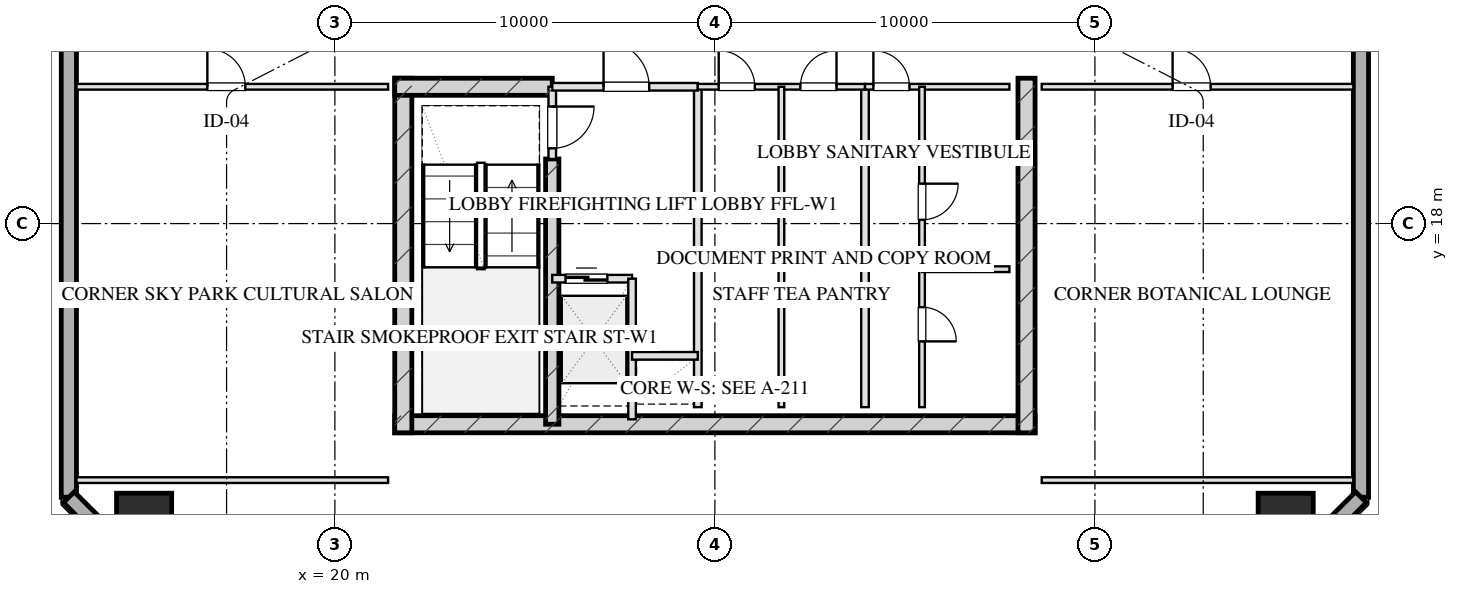
"""IFC4 building model, lengths in metres.
Left out: names, types, materials, properties, quantities, classifications, styles, units other than length and angle.
Written with IfcOpenShell. Run it as: python <this file> out.ifc"""

import sys

from ifc_helpers import new_model, si_unit, direction, frame, frame_2d, origin, origin_2d, place, context, subcontext, project, spatial, rectangle, hollow_rectangle, extrude, element, fill, save


model = new_model("IFC4")
c1 = context("Model", 3, precision=1e-05, world=origin(), true_north=direction((0.0, 1.0)))
c2 = subcontext(c1, "Body", "Model", "MODEL_VIEW")
j1 = project(units=[si_unit("LENGTHUNIT", "METRE"), si_unit("PLANEANGLEUNIT", "RADIAN")], contexts=[c1])
p1 = place(None, origin())
s1 = spatial("IfcSite", under=j1, at=p1, CompositionType="ELEMENT")
p2 = place(p1, origin())
s2 = spatial("IfcBuilding", under=s1, at=p2, CompositionType="ELEMENT")
p3 = place(p2, frame((0.0, 0.0, 216.2)))
s3 = spatial("IfcBuildingStorey", under=s2, at=p3, CompositionType="ELEMENT", Elevation=216.2)
p4 = place(p3, frame((21.575, 12.72, 0.0), z_axis=(0.0, 0.0, 1.0), x_axis=(1.0, 0.0, 0.0)))
e1 = element("IfcWall", 1, at=p4, inside=s3, PredefinedType="SHEAR", context=c2, shape_type="SweptSolid", body=[
    extrude(rectangle(XDim=16.85, YDim=0.45, at=frame_2d((8.425, 0.0))), origin(), (0.0, 0.0, 1.0), 3.45),
])
for number, where, z_axis, x_axis in (
    (2, (21.8, 21.825, 0.0), (0.0, 0.0, 1.0), (0.0, -1.0, 0.0)),
    (3, (38.2, 21.825, 0.0), (0.0, 0.0, 1.0), (0.0, -1.0, 0.0)),
):
    element("IfcWall", number, at=place(p3, frame(where, z_axis=z_axis, x_axis=x_axis)), inside=s3, PredefinedType="SHEAR", context=c2, shape_type="SweptSolid", body=[
        extrude(rectangle(XDim=9.33, YDim=0.45, at=frame_2d((4.665, 0.0))), origin(), (0.0, 0.0, 1.0), 3.45),
    ])
p5 = place(p3, frame((25.72, 19.7, 0.0), z_axis=(0.0, 0.0, 1.0), x_axis=(0.0, -1.0, 0.0)))
e4 = element("IfcWall", 4, at=p5, inside=s3, PredefinedType="SHEAR", context=c2, shape_type="SweptSolid", body=[
    extrude(rectangle(XDim=6.98, YDim=0.35, at=frame_2d((3.49, 0.0))), origin(), (0.0, 0.0, 1.0), 3.45),
])
p6 = place(p3, frame((21.575, 21.6, 0.0), z_axis=(0.0, 0.0, 1.0), x_axis=(1.0, 0.0, 0.0)))
e5 = element("IfcWall", 5, at=p6, inside=s3, PredefinedType="SHEAR", context=c2, shape_type="SweptSolid", body=[
    extrude(rectangle(XDim=4.145, YDim=0.45, at=frame_2d((2.073, 0.0))), origin(), (0.0, 0.0, 1.0), 3.45),
])
for number, where, z_axis, x_axis in (
    (6, (14.98, 10.18, 0.0), (0.0, 0.0, 1.0), (1.0, 0.0, 0.0)),
    (7, (45.02, 10.18, 0.0), (0.0, 0.0, 1.0), (1.0, 0.0, 0.0)),
):
    element("IfcColumn", number, at=place(p3, frame(where, z_axis=z_axis, x_axis=x_axis)), inside=s3, PredefinedType="COLUMN", context=c2, shape_type="SweptSolid", body=[
        extrude(hollow_rectangle(XDim=1.45, YDim=1.45, WallThickness=0.05, at=origin_2d()), origin(), (0.0, 0.0, 1.0), 3.451),
    ])
p7 = place(p3, frame((13.0, 10.8, 0.0), z_axis=(0.0, 0.0, 1.0), x_axis=(0.0, 1.0, 0.0)))
e8 = element("IfcWall", 8, at=p7, inside=s3, PredefinedType="SOLIDWALL", context=c2, shape_type="SweptSolid", body=[
    extrude(rectangle(XDim=46.4, YDim=0.4, at=frame_2d((23.2, 0.0))), origin(), (0.0, 0.0, 1.0), 2.55),
])
p8 = place(p7, frame((15.75, 0.0, 0.75)))
e9 = element("IfcOpeningElement", 9, at=p8, cuts=e8, PredefinedType="OPENING", context=c2, shape_type="SweptSolid", body=[
    extrude(rectangle(XDim=2.1, YDim=1.4, at=frame_2d((1.05, 0.7))), frame((0.0, 0.21, 0.0), z_axis=(0.0, -1.0, 0.0), x_axis=(1.0, 0.0, 0.0)), (0.0, 0.0, 1.0), 0.42),
])
p9 = place(p7, frame((19.55, 0.0, 0.75)))
e10 = element("IfcOpeningElement", 10, at=p9, cuts=e8, PredefinedType="OPENING", context=c2, shape_type="SweptSolid", body=[
    extrude(rectangle(XDim=2.1, YDim=1.4, at=frame_2d((1.05, 0.7))), frame((0.0, 0.21, 0.0), z_axis=(0.0, -1.0, 0.0), x_axis=(1.0, 0.0, 0.0)), (0.0, 0.0, 1.0), 0.42),
])
p10 = place(p7, frame((24.75, 0.0, 0.75)))
e11 = element("IfcOpeningElement", 11, at=p10, cuts=e8, PredefinedType="OPENING", context=c2, shape_type="SweptSolid", body=[
    extrude(rectangle(XDim=2.1, YDim=1.4, at=frame_2d((1.05, 0.7))), frame((0.0, 0.21, 0.0), z_axis=(0.0, -1.0, 0.0), x_axis=(1.0, 0.0, 0.0)), (0.0, 0.0, 1.0), 0.42),
])
p11 = place(p7, frame((28.55, 0.0, 0.75)))
e12 = element("IfcOpeningElement", 12, at=p11, cuts=e8, PredefinedType="OPENING", context=c2, shape_type="SweptSolid", body=[
    extrude(rectangle(XDim=2.1, YDim=1.4, at=frame_2d((1.05, 0.7))), frame((0.0, 0.21, 0.0), z_axis=(0.0, -1.0, 0.0), x_axis=(1.0, 0.0, 0.0)), (0.0, 0.0, 1.0), 0.42),
])
p12 = place(p3, frame((47.0, 57.2, 0.0), z_axis=(0.0, 0.0, 1.0), x_axis=(0.0, -1.0, 0.0)))
e13 = element("IfcWall", 13, at=p12, inside=s3, PredefinedType="SOLIDWALL", context=c2, shape_type="SweptSolid", body=[
    extrude(rectangle(XDim=46.4, YDim=0.4, at=frame_2d((23.2, 0.0))), origin(), (0.0, 0.0, 1.0), 2.55),
])
p13 = place(p12, frame((16.4, 0.0, 0.0)))
e14 = element("IfcOpeningElement", 14, at=p13, cuts=e13, PredefinedType="OPENING", context=c2, shape_type="SweptSolid", body=[
    extrude(rectangle(XDim=1.8, YDim=2.2, at=frame_2d((0.9, 1.1))), frame((0.0, 0.21, 0.0), z_axis=(0.0, -1.0, 0.0), x_axis=(1.0, 0.0, 0.0)), (0.0, 0.0, 1.0), 0.42),
])
for number, where, z_axis, x_axis in (
    (15, (47.0, 10.8, 0.0), (0.0, 0.0, 1.0), (-0.707, -0.707, 0.0)),
    (16, (15.6, 8.2, 0.0), (0.0, 0.0, 1.0), (-0.707, 0.707, 0.0)),
):
    element("IfcWall", number, at=place(p3, frame(where, z_axis=z_axis, x_axis=x_axis)), inside=s3, PredefinedType="SOLIDWALL", context=c2, shape_type="SweptSolid", body=[
        extrude(rectangle(XDim=3.677, YDim=0.4, at=frame_2d((1.838, 0.0))), origin(), (0.0, 0.0, 1.0), 2.55),
    ])
p14 = place(p3, frame((47.35, 26.55, 0.0), z_axis=(0.0, 0.0, 1.0), x_axis=(0.991732402874, -0.128323189996, 0.0)))
e17 = element("IfcWall", 17, at=p14, inside=s3, PredefinedType="SOLIDWALL", context=c2, shape_type="SweptSolid", body=[
    extrude(rectangle(XDim=31.725, YDim=0.35, at=frame_2d((15.862, 0.0))), origin(), (0.0, 0.0, 1.0), 3.15),
])
p15 = place(p3, frame((25.72, 21.6, 0.0), z_axis=(0.0, 0.0, 1.0), x_axis=(0.0, -1.0, 0.0)))
e18 = element("IfcWall", 18, at=p15, inside=s3, PredefinedType="PARTITIONING", context=c2, shape_type="SweptSolid", body=[
    extrude(rectangle(XDim=1.9, YDim=0.2, at=frame_2d((0.95, 0.0))), origin(), (0.0, 0.0, 1.0), 3.155),
])
p16 = place(p15, frame((0.52, 0.0, 0.0)))
e19 = element("IfcOpeningElement", 19, at=p16, cuts=e18, PredefinedType="OPENING", context=c2, shape_type="SweptSolid", body=[
    extrude(rectangle(XDim=1.1, YDim=2.05, at=frame_2d((0.55, 1.025))), frame((0.0, 0.11, 0.0), z_axis=(0.0, -1.0, 0.0), x_axis=(1.0, 0.0, 0.0)), (0.0, 0.0, 1.0), 0.22),
])
p17 = place(p3, frame((29.55, 21.6, 0.0), z_axis=(0.0, 0.0, 1.0), x_axis=(0.0, -1.0, 0.0)))
e20 = element("IfcWall", 20, at=p17, inside=s3, PredefinedType="PARTITIONING", context=c2, shape_type="SweptSolid", body=[
    extrude(rectangle(XDim=8.43, YDim=0.2, at=frame_2d((4.215, 0.0))), origin(), (0.0, 0.0, 1.0), 3.155),
])
p18 = place(p3, frame((25.72, 21.6, 0.0), z_axis=(0.0, 0.0, 1.0), x_axis=(1.0, 0.0, 0.0)))
e21 = element("IfcWall", 21, at=p18, inside=s3, PredefinedType="PARTITIONING", context=c2, shape_type="SweptSolid", body=[
    extrude(rectangle(XDim=3.83, YDim=0.2, at=frame_2d((1.915, 0.0))), origin(), (0.0, 0.0, 1.0), 3.155),
])
p19 = place(p18, frame((1.35, 0.0, 0.0)))
e22 = element("IfcOpeningElement", 22, at=p19, cuts=e21, PredefinedType="OPENING", context=c2, shape_type="SweptSolid", body=[
    extrude(rectangle(XDim=1.2, YDim=2.05, at=frame_2d((0.6, 1.025))), frame((0.0, 0.11, 0.0), z_axis=(0.0, -1.0, 0.0), x_axis=(1.0, 0.0, 0.0)), (0.0, 0.0, 1.0), 0.22),
])
p20 = place(p3, frame((25.72, 16.55, 0.0), z_axis=(0.0, 0.0, 1.0), x_axis=(1.0, 0.0, 0.0)))
e23 = element("IfcWall", 23, at=p20, inside=s3, PredefinedType="PARTITIONING", context=c2, shape_type="SweptSolid", body=[
    extrude(rectangle(XDim=2.1, YDim=0.2, at=frame_2d((1.05, 0.0))), origin(), (0.0, 0.0, 1.0), 3.155),
])
p21 = place(p20, frame((0.35, 0.0, 0.0)))
e24 = element("IfcOpeningElement", 24, at=p21, cuts=e23, PredefinedType="OPENING", context=c2, shape_type="SweptSolid", body=[
    extrude(rectangle(XDim=1.1, YDim=2.05, at=frame_2d((0.55, 1.025))), frame((0.0, 0.11, 0.0), z_axis=(0.0, -1.0, 0.0), x_axis=(1.0, 0.0, 0.0)), (0.0, 0.0, 1.0), 0.22),
])
p22 = place(p3, frame((27.82, 16.55, 0.0), z_axis=(0.0, 0.0, 1.0), x_axis=(0.0, -1.0, 0.0)))
e25 = element("IfcWall", 25, at=p22, inside=s3, PredefinedType="PARTITIONING", context=c2, shape_type="SweptSolid", body=[
    extrude(rectangle(XDim=3.7, YDim=0.2, at=frame_2d((1.85, 0.0))), origin(), (0.0, 0.0, 1.0), 3.155),
])
p23 = place(p3, frame((27.82, 14.52, 0.0), z_axis=(0.0, 0.0, 1.0), x_axis=(1.0, 0.0, 0.0)))
e26 = element("IfcWall", 26, at=p23, inside=s3, PredefinedType="PARTITIONING", context=c2, shape_type="SweptSolid", body=[
    extrude(rectangle(XDim=1.73, YDim=0.2, at=frame_2d((0.865, 0.0))), origin(), (0.0, 0.0, 1.0), 3.155),
])
p24 = place(p3, frame((33.95, 21.6, 0.0), z_axis=(0.0, 0.0, 1.0), x_axis=(0.0, -1.0, 0.0)))
e27 = element("IfcWall", 27, at=p24, inside=s3, PredefinedType="PARTITIONING", context=c2, shape_type="SweptSolid", body=[
    extrude(rectangle(XDim=8.43, YDim=0.2, at=frame_2d((4.215, 0.0))), origin(), (0.0, 0.0, 1.0), 3.155),
])
p25 = place(p3, frame((29.55, 21.6, 0.0), z_axis=(0.0, 0.0, 1.0), x_axis=(1.0, 0.0, 0.0)))
e28 = element("IfcWall", 28, at=p25, inside=s3, PredefinedType="PARTITIONING", context=c2, shape_type="SweptSolid", body=[
    extrude(rectangle(XDim=4.4, YDim=0.15, at=frame_2d((2.2, 0.0))), origin(), (0.0, 0.0, 1.0), 3.155),
])
p26 = place(p25, frame((0.55, 0.0, 0.0)))
e29 = element("IfcOpeningElement", 29, at=p26, cuts=e28, PredefinedType="OPENING", context=c2, shape_type="SweptSolid", body=[
    extrude(rectangle(XDim=0.95, YDim=2.05, at=frame_2d((0.475, 1.025))), frame((0.0, 0.085, 0.0), z_axis=(0.0, -1.0, 0.0), x_axis=(1.0, 0.0, 0.0)), (0.0, 0.0, 1.0), 0.17),
])
p27 = place(p25, frame((2.7, 0.0, 0.0)))
e30 = element("IfcOpeningElement", 30, at=p27, cuts=e28, PredefinedType="OPENING", context=c2, shape_type="SweptSolid", body=[
    extrude(rectangle(XDim=0.95, YDim=2.05, at=frame_2d((0.475, 1.025))), frame((0.0, 0.085, 0.0), z_axis=(0.0, -1.0, 0.0), x_axis=(1.0, 0.0, 0.0)), (0.0, 0.0, 1.0), 0.17),
])
p28 = place(p3, frame((31.75, 21.6, 0.0), z_axis=(0.0, 0.0, 1.0), x_axis=(0.0, -1.0, 0.0)))
e31 = element("IfcWall", 31, at=p28, inside=s3, PredefinedType="PARTITIONING", context=c2, shape_type="SweptSolid", body=[
    extrude(rectangle(XDim=8.43, YDim=0.15, at=frame_2d((4.215, 0.0))), origin(), (0.0, 0.0, 1.0), 3.155),
])
p29 = place(p3, frame((33.95, 21.6, 0.0), z_axis=(0.0, 0.0, 1.0), x_axis=(1.0, 0.0, 0.0)))
e32 = element("IfcWall", 32, at=p29, inside=s3, PredefinedType="PARTITIONING", context=c2, shape_type="SweptSolid", body=[
    extrude(rectangle(XDim=3.8, YDim=0.15, at=frame_2d((1.9, 0.0))), origin(), (0.0, 0.0, 1.0), 3.155),
])
p30 = place(p29, frame((0.22, 0.0, 0.0)))
e33 = element("IfcOpeningElement", 33, at=p30, cuts=e32, PredefinedType="OPENING", context=c2, shape_type="SweptSolid", body=[
    extrude(rectangle(XDim=0.95, YDim=2.05, at=frame_2d((0.475, 1.025))), frame((0.0, 0.085, 0.0), z_axis=(0.0, -1.0, 0.0), x_axis=(1.0, 0.0, 0.0)), (0.0, 0.0, 1.0), 0.17),
])
p31 = place(p3, frame((35.45, 21.6, 0.0), z_axis=(0.0, 0.0, 1.0), x_axis=(0.0, -1.0, 0.0)))
e34 = element("IfcWall", 34, at=p31, inside=s3, PredefinedType="PARTITIONING", context=c2, shape_type="SweptSolid", body=[
    extrude(rectangle(XDim=8.43, YDim=0.15, at=frame_2d((4.215, 0.0))), origin(), (0.0, 0.0, 1.0), 2.745),
])
p32 = place(p31, frame((2.55, 0.0, 0.0)))
e35 = element("IfcOpeningElement", 35, at=p32, cuts=e34, PredefinedType="OPENING", context=c2, shape_type="SweptSolid", body=[
    extrude(rectangle(XDim=0.95, YDim=2.05, at=frame_2d((0.475, 1.025))), frame((0.0, 0.085, 0.0), z_axis=(0.0, -1.0, 0.0), x_axis=(1.0, 0.0, 0.0)), (0.0, 0.0, 1.0), 0.17),
])
p33 = place(p31, frame((5.8, 0.0, 0.0)))
e36 = element("IfcOpeningElement", 36, at=p33, cuts=e34, PredefinedType="OPENING", context=c2, shape_type="SweptSolid", body=[
    extrude(rectangle(XDim=0.9, YDim=2.05, at=frame_2d((0.45, 1.025))), frame((0.0, 0.085, 0.0), z_axis=(0.0, -1.0, 0.0), x_axis=(1.0, 0.0, 0.0)), (0.0, 0.0, 1.0), 0.17),
])
p34 = place(p3, frame((35.45, 16.8, 0.0), z_axis=(0.0, 0.0, 1.0), x_axis=(1.0, 0.0, 0.0)))
e37 = element("IfcWall", 37, at=p34, inside=s3, PredefinedType="PARTITIONING", context=c2, shape_type="SweptSolid", body=[
    extrude(rectangle(XDim=2.3, YDim=0.15, at=frame_2d((1.15, 0.0))), origin(), (0.0, 0.0, 1.0), 3.155),
])
p35 = place(p3, frame((13.2, 11.25, 0.0), z_axis=(0.0, 0.0, 1.0), x_axis=(1.0, 0.0, 0.0)))
e38 = element("IfcWall", 38, at=p35, inside=s3, PredefinedType="PARTITIONING", context=c2, shape_type="SweptSolid", body=[
    extrude(rectangle(XDim=8.2, YDim=0.15, at=frame_2d((4.1, 0.0))), origin(), (0.0, 0.0, 1.0), 3.155),
])
p36 = place(p3, frame((13.2, 21.6, 0.0), z_axis=(0.0, 0.0, 1.0), x_axis=(1.0, 0.0, 0.0)))
e39 = element("IfcWall", 39, at=p36, inside=s3, PredefinedType="PARTITIONING", context=c2, shape_type="SweptSolid", body=[
    extrude(rectangle(XDim=8.2, YDim=0.15, at=frame_2d((4.1, 0.0))), origin(), (0.0, 0.0, 1.0), 3.155),
])
p37 = place(p36, frame((3.444, 0.0, 0.0)))
e40 = element("IfcOpeningElement", 40, at=p37, cuts=e39, PredefinedType="OPENING", context=c2, shape_type="SweptSolid", body=[
    extrude(rectangle(XDim=1.0, YDim=2.05, at=frame_2d((0.5, 1.025))), frame((0.0, 0.085, 0.0), z_axis=(0.0, -1.0, 0.0), x_axis=(1.0, 0.0, 0.0)), (0.0, 0.0, 1.0), 0.17),
])
p38 = place(p3, frame((38.6, 11.25, 0.0), z_axis=(0.0, 0.0, 1.0), x_axis=(1.0, 0.0, 0.0)))
e41 = element("IfcWall", 41, at=p38, inside=s3, PredefinedType="PARTITIONING", context=c2, shape_type="SweptSolid", body=[
    extrude(rectangle(XDim=8.2, YDim=0.15, at=frame_2d((4.1, 0.0))), origin(), (0.0, 0.0, 1.0), 3.155),
])
p39 = place(p3, frame((38.6, 21.6, 0.0), z_axis=(0.0, 0.0, 1.0), x_axis=(1.0, 0.0, 0.0)))
e42 = element("IfcWall", 42, at=p39, inside=s3, PredefinedType="PARTITIONING", context=c2, shape_type="SweptSolid", body=[
    extrude(rectangle(XDim=8.2, YDim=0.15, at=frame_2d((4.1, 0.0))), origin(), (0.0, 0.0, 1.0), 3.155),
])
p40 = place(p39, frame((3.444, 0.0, 0.0)))
e43 = element("IfcOpeningElement", 43, at=p40, cuts=e42, PredefinedType="OPENING", context=c2, shape_type="SweptSolid", body=[
    extrude(rectangle(XDim=1.0, YDim=2.05, at=frame_2d((0.5, 1.025))), frame((0.0, 0.085, 0.0), z_axis=(0.0, -1.0, 0.0), x_axis=(1.0, 0.0, 0.0)), (0.0, 0.0, 1.0), 0.17),
])
p41 = place(p16, origin())
e44 = element("IfcDoor", 44, at=p41, inside=s3, OperationType="SINGLE_SWING_LEFT", PredefinedType="DOOR", context=c2, shape_type="SweptSolid", body=[
    extrude(rectangle(XDim=1.1, YDim=2.05, at=frame_2d((0.55, 1.025))), frame((0.0, 0.025, 0.0), z_axis=(0.0, -1.0, 0.0), x_axis=(1.0, 0.0, 0.0)), (0.0, 0.0, 1.0), 0.05),
])
fill(e19, e44)
p42 = place(p19, origin())
e45 = element("IfcDoor", 45, at=p42, inside=s3, OperationType="SINGLE_SWING_LEFT", PredefinedType="DOOR", context=c2, shape_type="SweptSolid", body=[
    extrude(rectangle(XDim=1.2, YDim=2.05, at=frame_2d((0.6, 1.025))), frame((0.0, 0.025, 0.0), z_axis=(0.0, -1.0, 0.0), x_axis=(1.0, 0.0, 0.0)), (0.0, 0.0, 1.0), 0.05),
])
fill(e22, e45)
p43 = place(p21, origin())
e46 = element("IfcDoor", 46, at=p43, inside=s3, OperationType="DOUBLE_DOOR_SLIDING", PredefinedType="DOOR", context=c2, shape_type="SweptSolid", body=[
    extrude(rectangle(XDim=1.1, YDim=2.05, at=frame_2d((0.55, 1.025))), frame((0.0, 0.025, 0.0), z_axis=(0.0, -1.0, 0.0), x_axis=(1.0, 0.0, 0.0)), (0.0, 0.0, 1.0), 0.05),
])
fill(e24, e46)
p44 = place(p26, origin())
e47 = element("IfcDoor", 47, at=p44, inside=s3, OperationType="SINGLE_SWING_LEFT", PredefinedType="DOOR", context=c2, shape_type="SweptSolid", body=[
    extrude(rectangle(XDim=0.95, YDim=2.05, at=frame_2d((0.475, 1.025))), frame((0.0, 0.025, 0.0), z_axis=(0.0, -1.0, 0.0), x_axis=(1.0, 0.0, 0.0)), (0.0, 0.0, 1.0), 0.05),
])
fill(e29, e47)
p45 = place(p27, origin())
e48 = element("IfcDoor", 48, at=p45, inside=s3, OperationType="SINGLE_SWING_RIGHT", PredefinedType="DOOR", context=c2, shape_type="SweptSolid", body=[
    extrude(rectangle(XDim=0.95, YDim=2.05, at=frame_2d((0.475, 1.025))), frame((0.0, 0.025, 0.0), z_axis=(0.0, -1.0, 0.0), x_axis=(1.0, 0.0, 0.0)), (0.0, 0.0, 1.0), 0.05),
])
fill(e30, e48)
p46 = place(p30, origin())
e49 = element("IfcDoor", 49, at=p46, inside=s3, OperationType="SINGLE_SWING_LEFT", PredefinedType="DOOR", context=c2, shape_type="SweptSolid", body=[
    extrude(rectangle(XDim=0.95, YDim=2.05, at=frame_2d((0.475, 1.025))), frame((0.0, 0.025, 0.0), z_axis=(0.0, -1.0, 0.0), x_axis=(1.0, 0.0, 0.0)), (0.0, 0.0, 1.0), 0.05),
])
fill(e33, e49)
p47 = place(p32, origin())
e50 = element("IfcDoor", 50, at=p47, inside=s3, OperationType="SINGLE_SWING_LEFT", PredefinedType="DOOR", context=c2, shape_type="SweptSolid", body=[
    extrude(rectangle(XDim=0.95, YDim=2.05, at=frame_2d((0.475, 1.025))), frame((0.0, 0.025, 0.0), z_axis=(0.0, -1.0, 0.0), x_axis=(1.0, 0.0, 0.0)), (0.0, 0.0, 1.0), 0.05),
])
fill(e35, e50)
p48 = place(p33, origin())
e51 = element("IfcDoor", 51, at=p48, inside=s3, OperationType="SINGLE_SWING_RIGHT", PredefinedType="DOOR", context=c2, shape_type="SweptSolid", body=[
    extrude(rectangle(XDim=0.9, YDim=2.05, at=frame_2d((0.45, 1.025))), frame((0.0, 0.025, 0.0), z_axis=(0.0, -1.0, 0.0), x_axis=(1.0, 0.0, 0.0)), (0.0, 0.0, 1.0), 0.05),
])
fill(e36, e51)
p49 = place(p37, origin())
e52 = element("IfcDoor", 52, at=p49, inside=s3, OperationType="SINGLE_SWING_LEFT", PredefinedType="DOOR", context=c2, shape_type="SweptSolid", body=[
    extrude(rectangle(XDim=1.0, YDim=2.05, at=frame_2d((0.5, 1.025))), frame((0.0, 0.025, 0.0), z_axis=(0.0, -1.0, 0.0), x_axis=(1.0, 0.0, 0.0)), (0.0, 0.0, 1.0), 0.05),
])
fill(e40, e52)
p50 = place(p40, origin())
e53 = element("IfcDoor", 53, at=p50, inside=s3, OperationType="SINGLE_SWING_LEFT", PredefinedType="DOOR", context=c2, shape_type="SweptSolid", body=[
    extrude(rectangle(XDim=1.0, YDim=2.05, at=frame_2d((0.5, 1.025))), frame((0.0, 0.025, 0.0), z_axis=(0.0, -1.0, 0.0), x_axis=(1.0, 0.0, 0.0)), (0.0, 0.0, 1.0), 0.05),
])
fill(e43, e53)
save(model, sys.argv[1])
